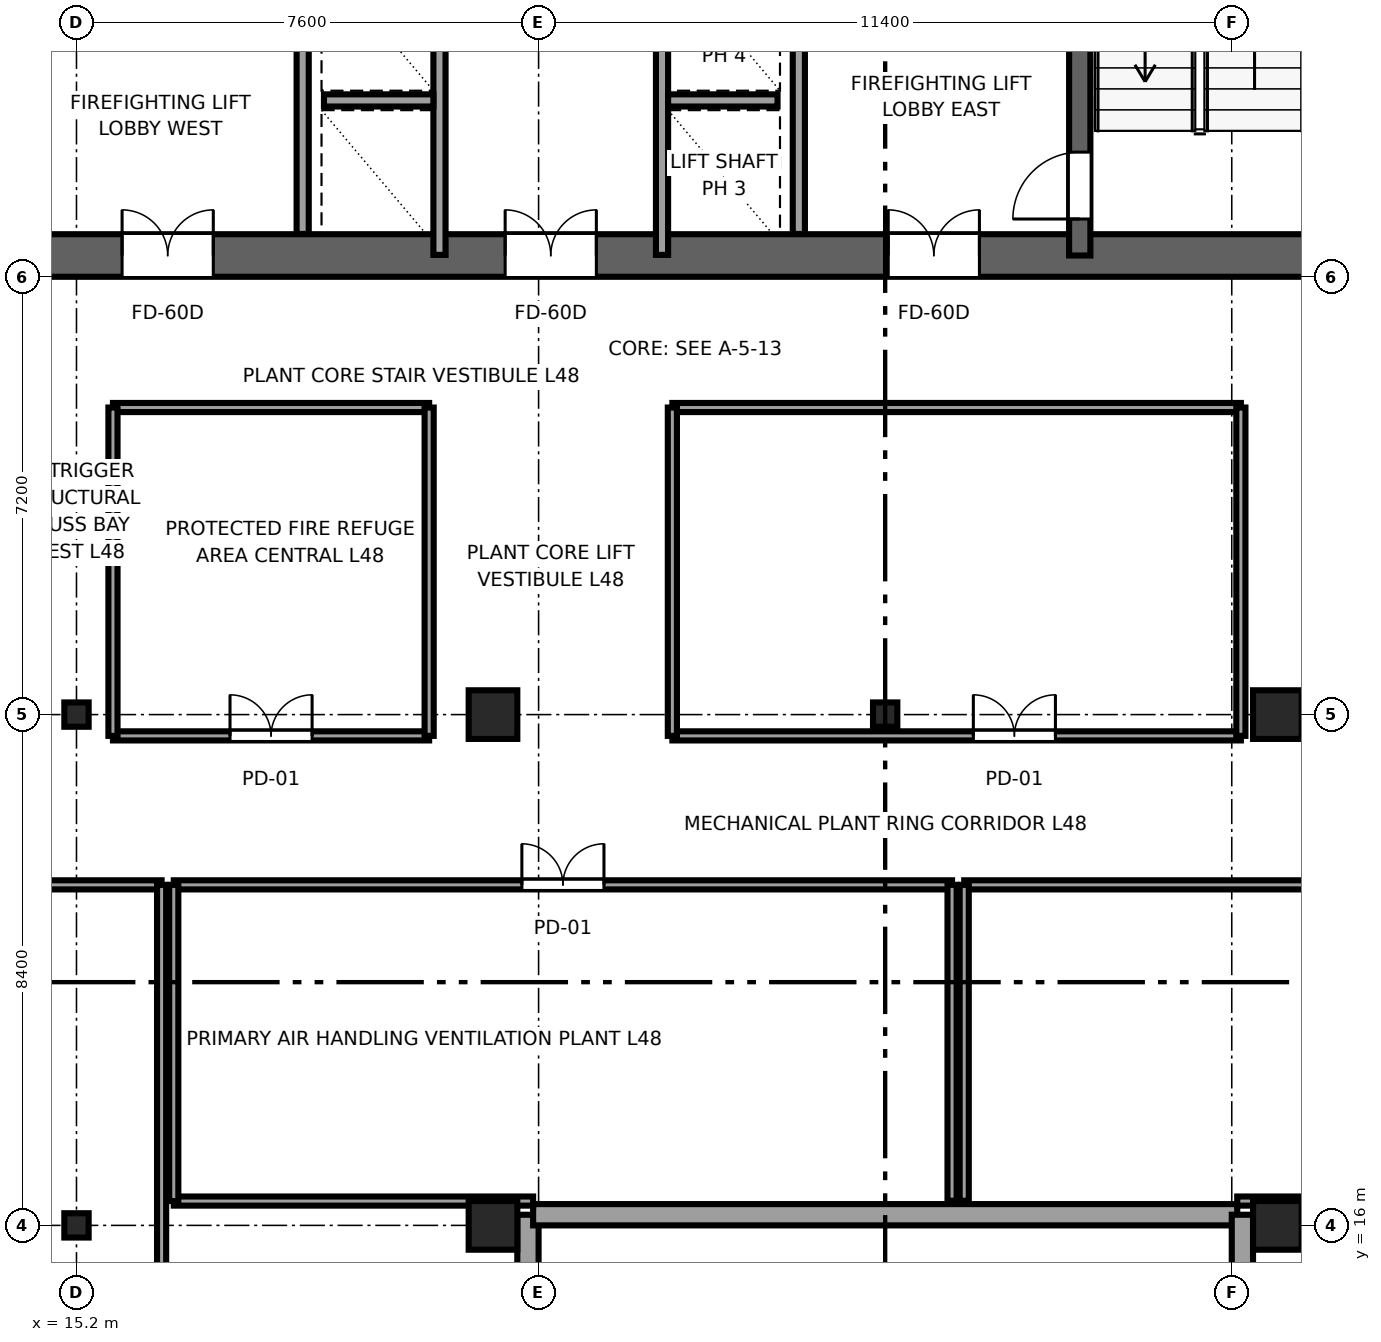
"""IFC4 building model, lengths in metres.
Left out: names, types, materials, properties, quantities, classifications, styles, units other than length and angle.
Written with IfcOpenShell. Run it as: python <this file> out.ifc"""

import sys

from ifc_helpers import new_model, si_unit, direction, frame, frame_2d, origin, origin_2d, place, context, subcontext, project, spatial, rectangle, i_section, extrude, source, transform, mapped, element, fill, save


model = new_model("IFC4")
c1 = context("Model", 3, precision=1e-05, world=origin(), true_north=direction((0.0, 1.0)))
c2 = subcontext(c1, "Body", "Model", "MODEL_VIEW")
j1 = project(units=[si_unit("LENGTHUNIT", "METRE"), si_unit("PLANEANGLEUNIT", "RADIAN")], contexts=[c1])
p1 = place(None, origin())
s1 = spatial("IfcSite", under=j1, at=p1, CompositionType="ELEMENT")
p2 = place(p1, origin())
s2 = spatial("IfcBuilding", under=s1, at=p2, CompositionType="ELEMENT")
p3 = place(p2, frame((0.0, 0.0, 182.55)))
s3 = spatial("IfcBuildingStorey", under=s2, at=p3, CompositionType="ELEMENT", Elevation=182.55)
p4 = place(p3, frame((9.8, 31.95, 0.0), z_axis=(0.0, 0.0, 1.0), x_axis=(1.0, 0.0, 0.0)))
e1 = element("IfcWall", 1, at=p4, inside=s3, PredefinedType="SHEAR", context=c2, shape_type="SweptSolid", body=[
    extrude(rectangle(XDim=26.4, YDim=0.7, at=frame_2d((13.2, 0.0))), origin(), (0.0, 0.0, 1.0), 5.0),
])
p5 = place(p4, frame((7.65, 0.0, 0.0), z_axis=(0.0, 0.0, 1.0), x_axis=(-1.0, 0.0, 0.0)))
e2 = element("IfcOpeningElement", 2, at=p5, cuts=e1, PredefinedType="OPENING", context=c2, shape_type="SweptSolid", body=[
    extrude(rectangle(XDim=1.5, YDim=2.04, at=frame_2d((0.75, 1.02))), frame((0.0, 0.36, 0.0), z_axis=(0.0, -1.0, 0.0), x_axis=(1.0, 0.0, 0.0)), (0.0, 0.0, 1.0), 0.72),
])
p6 = place(p4, frame((13.95, 0.0, 0.0), z_axis=(0.0, 0.0, 1.0), x_axis=(-1.0, 0.0, 0.0)))
e3 = element("IfcOpeningElement", 3, at=p6, cuts=e1, PredefinedType="OPENING", context=c2, shape_type="SweptSolid", body=[
    extrude(rectangle(XDim=1.5, YDim=2.04, at=frame_2d((0.75, 1.02))), frame((0.0, 0.36, 0.0), z_axis=(0.0, -1.0, 0.0), x_axis=(1.0, 0.0, 0.0)), (0.0, 0.0, 1.0), 0.72),
])
p7 = place(p4, frame((20.25, 0.0, 0.0), z_axis=(0.0, 0.0, 1.0), x_axis=(-1.0, 0.0, 0.0)))
e4 = element("IfcOpeningElement", 4, at=p7, cuts=e1, PredefinedType="OPENING", context=c2, shape_type="SweptSolid", body=[
    extrude(rectangle(XDim=1.5, YDim=2.04, at=frame_2d((0.75, 1.02))), frame((0.0, 0.36, 0.0), z_axis=(0.0, -1.0, 0.0), x_axis=(1.0, 0.0, 0.0)), (0.0, 0.0, 1.0), 0.72),
])
p8 = place(p3, frame((31.7, 31.95, 0.0), z_axis=(0.0, 0.0, 1.0), x_axis=(0.0, 1.0, 0.0)))
e5 = element("IfcWall", 5, at=p8, inside=s3, PredefinedType="SHEAR", context=c2, shape_type="SweptSolid", body=[
    extrude(rectangle(XDim=12.9, YDim=0.35, at=frame_2d((6.45, 0.0))), origin(), (0.0, 0.0, 1.0), 5.0),
])
p9 = place(p8, frame((1.7, 0.0, 0.0), z_axis=(0.0, 0.0, 1.0), x_axis=(-1.0, 0.0, 0.0)))
e6 = element("IfcOpeningElement", 6, at=p9, cuts=e5, PredefinedType="OPENING", context=c2, shape_type="SweptSolid", body=[
    extrude(rectangle(XDim=1.1, YDim=2.12, at=frame_2d((0.55, 1.06))), frame((0.0, 0.185, 0.0), z_axis=(0.0, -1.0, 0.0), x_axis=(1.0, 0.0, 0.0)), (0.0, 0.0, 1.0), 0.37),
])
m1 = source(origin(), c2, "Body", "SweptSolid", [
    extrude(i_section(OverallWidth=0.4, OverallDepth=0.4, WebThickness=0.02, FlangeThickness=0.035, at=origin_2d()), origin(), (0.0, 0.0, 1.0), 5.0),
])
for number, where, z_axis, x_axis in (
    (7, (15.2, 16.0, 0.0), (0.0, 0.0, 1.0), (1.0, 0.0, 0.0)),
    (8, (15.2, 24.4, 0.0), (0.0, 0.0, 1.0), (1.0, 0.0, 0.0)),
):
    element("IfcColumn", number, at=place(p3, frame(where, z_axis=z_axis, x_axis=x_axis)), inside=s3, PredefinedType="COLUMN", context=c2, shape_type="MappedRepresentation", body=[
        mapped(m1, transform((0.0, 0.0, 0.0), x_axis=(1.0, 0.0, 0.0), y_axis=(0.0, 1.0, 0.0), z_axis=(0.0, 0.0, 1.0), scale=1.0)),
    ])
m2 = source(origin(), c2, "Body", "SweptSolid", [
    extrude(rectangle(XDim=0.8, YDim=0.8, at=origin_2d()), origin(), (0.0, 0.0, 1.0), 5.0),
])
for number, where, z_axis, x_axis in (
    (9, (22.05, 16.0, 0.0), (0.0, 0.0, 1.0), (1.0, 0.0, 0.0)),
    (10, (22.05, 24.4, 0.0), (0.0, 0.0, 1.0), (1.0, 0.0, 0.0)),
    (11, (34.95, 16.0, 0.0), (0.0, 0.0, 1.0), (1.0, 0.0, 0.0)),
    (12, (34.95, 24.4, 0.0), (0.0, 0.0, 1.0), (1.0, 0.0, 0.0)),
):
    element("IfcColumn", number, at=place(p3, frame(where, z_axis=z_axis, x_axis=x_axis)), inside=s3, PredefinedType="COLUMN", context=c2, shape_type="MappedRepresentation", body=[
        mapped(m2, transform((0.0, 0.0, 0.0), x_axis=(1.0, 0.0, 0.0), y_axis=(0.0, 1.0, 0.0), z_axis=(0.0, 0.0, 1.0), scale=1.0)),
    ])
p10 = place(p3, frame((28.5, 24.4, 0.0), z_axis=(0.0, 0.0, 1.0), x_axis=(1.0, 0.0, 0.0)))
e13 = element("IfcColumn", 13, at=p10, inside=s3, PredefinedType="COLUMN", context=c2, shape_type="MappedRepresentation", body=[
    mapped(m1, transform((0.0, 0.0, 0.0), x_axis=(1.0, 0.0, 0.0), y_axis=(0.0, 1.0, 0.0), z_axis=(0.0, 0.0, 1.0), scale=1.0)),
])
p11 = place(p3, frame((22.625, 2.775, 0.0), z_axis=(0.0, 0.0, 1.0), x_axis=(0.0, 1.0, 0.0)))
e14 = element("IfcWall", 14, at=p11, inside=s3, PredefinedType="SOLIDWALL", context=c2, shape_type="SweptSolid", body=[
    extrude(rectangle(XDim=13.4, YDim=0.35, at=frame_2d((6.7, 0.0))), origin(), (0.0, 0.0, 1.0), 4.82),
])
p12 = place(p3, frame((22.71, 16.175, 0.0), z_axis=(0.0, 0.0, 1.0), x_axis=(1.0, 0.0, 0.0)))
e15 = element("IfcWall", 15, at=p12, inside=s3, PredefinedType="SOLIDWALL", context=c2, shape_type="SweptSolid", body=[
    extrude(rectangle(XDim=11.58, YDim=0.35, at=frame_2d((5.79, 0.0))), origin(), (0.0, 0.0, 1.0), 4.208),
])
p13 = place(p3, frame((34.375, 16.175, 0.0), z_axis=(0.0, 0.0, 1.0), x_axis=(0.0, -1.0, 0.0)))
e16 = element("IfcWall", 16, at=p13, inside=s3, PredefinedType="SOLIDWALL", context=c2, shape_type="SweptSolid", body=[
    extrude(rectangle(XDim=13.4, YDim=0.35, at=frame_2d((6.7, 0.0))), origin(), (0.0, 0.0, 1.0), 4.82),
])
for number, where, z_axis, x_axis in (
    (17, (18.92, 32.304, 0.0), (0.0, 0.0, 1.0), (0.0, 1.0, 0.0)),
    (18, (27.08, 32.304, 0.0), (0.0, 0.0, 1.0), (0.0, 1.0, 0.0)),
):
    element("IfcWall", number, at=place(p3, frame(where, z_axis=z_axis, x_axis=x_axis)), inside=s3, PredefinedType="SOLIDWALL", context=c2, shape_type="SweptSolid", body=[
        extrude(rectangle(XDim=3.846, YDim=0.2, at=frame_2d((1.923, 0.0))), origin(), (0.0, 0.0, 1.0), 4.82),
    ])
p14 = place(p3, frame((21.17, 31.96, 0.0), z_axis=(0.0, 0.0, 1.0), x_axis=(0.0, 1.0, 0.0)))
e19 = element("IfcWall", 19, at=p14, inside=s3, PredefinedType="SOLIDWALL", context=c2, shape_type="SweptSolid", body=[
    extrude(rectangle(XDim=12.58, YDim=0.2, at=frame_2d((6.29, 0.0))), origin(), (0.0, 0.0, 1.0), 4.82),
])
p15 = place(p14, frame((5.74, 0.0, 0.0)))
e20 = element("IfcOpeningElement", 20, at=p15, cuts=e19, PredefinedType="OPENING", context=c2, shape_type="SweptSolid", body=[
    extrude(rectangle(XDim=1.1, YDim=2.12, at=frame_2d((0.55, 1.06))), frame((0.0, 0.11, 0.0), z_axis=(0.0, -1.0, 0.0), x_axis=(1.0, 0.0, 0.0)), (0.0, 0.0, 1.0), 0.22),
])
p16 = place(p14, frame((8.24, 0.0, 0.0)))
e21 = element("IfcOpeningElement", 21, at=p16, cuts=e19, PredefinedType="OPENING", context=c2, shape_type="SweptSolid", body=[
    extrude(rectangle(XDim=1.1, YDim=2.12, at=frame_2d((0.55, 1.06))), frame((0.0, 0.11, 0.0), z_axis=(0.0, -1.0, 0.0), x_axis=(1.0, 0.0, 0.0)), (0.0, 0.0, 1.0), 0.22),
])
p17 = place(p3, frame((19.27, 34.5, 0.0), z_axis=(0.0, 0.0, 1.0), x_axis=(1.0, 0.0, 0.0)))
e22 = element("IfcWall", 22, at=p17, inside=s3, PredefinedType="SOLIDWALL", context=c2, shape_type="SweptSolid", body=[
    extrude(rectangle(XDim=1.8, YDim=0.2, at=frame_2d((0.9, 0.0))), origin(), (0.0, 0.0, 1.0), 4.82),
])
p18 = place(p3, frame((24.83, 31.96, 0.0), z_axis=(0.0, 0.0, 1.0), x_axis=(0.0, 1.0, 0.0)))
e23 = element("IfcWall", 23, at=p18, inside=s3, PredefinedType="SOLIDWALL", context=c2, shape_type="SweptSolid", body=[
    extrude(rectangle(XDim=12.58, YDim=0.2, at=frame_2d((6.29, 0.0))), origin(), (0.0, 0.0, 1.0), 4.82),
])
p19 = place(p18, frame((5.74, 0.0, 0.0)))
e24 = element("IfcOpeningElement", 24, at=p19, cuts=e23, PredefinedType="OPENING", context=c2, shape_type="SweptSolid", body=[
    extrude(rectangle(XDim=1.1, YDim=2.12, at=frame_2d((0.55, 1.06))), frame((0.0, 0.11, 0.0), z_axis=(0.0, -1.0, 0.0), x_axis=(1.0, 0.0, 0.0)), (0.0, 0.0, 1.0), 0.22),
])
p20 = place(p18, frame((8.24, 0.0, 0.0)))
e25 = element("IfcOpeningElement", 25, at=p20, cuts=e23, PredefinedType="OPENING", context=c2, shape_type="SweptSolid", body=[
    extrude(rectangle(XDim=1.1, YDim=2.12, at=frame_2d((0.55, 1.06))), frame((0.0, 0.11, 0.0), z_axis=(0.0, -1.0, 0.0), x_axis=(1.0, 0.0, 0.0)), (0.0, 0.0, 1.0), 0.22),
])
p21 = place(p3, frame((24.93, 34.5, 0.0), z_axis=(0.0, 0.0, 1.0), x_axis=(1.0, 0.0, 0.0)))
e26 = element("IfcWall", 26, at=p21, inside=s3, PredefinedType="SOLIDWALL", context=c2, shape_type="SweptSolid", body=[
    extrude(rectangle(XDim=1.8, YDim=0.2, at=frame_2d((0.9, 0.0))), origin(), (0.0, 0.0, 1.0), 4.82),
])
p22 = place(p3, frame((15.8, 24.05, 0.0), z_axis=(0.0, 0.0, 1.0), x_axis=(1.0, 0.0, 0.0)))
e27 = element("IfcWall", 27, at=p22, inside=s3, PredefinedType="PARTITIONING", context=c2, shape_type="SweptSolid", body=[
    extrude(rectangle(XDim=5.2, YDim=0.15, at=frame_2d((2.6, 0.0))), origin(), (0.0, 0.0, 1.0), 4.82),
])
p23 = place(p22, frame((1.925, 0.0, 0.0)))
e28 = element("IfcOpeningElement", 28, at=p23, cuts=e27, PredefinedType="OPENING", context=c2, shape_type="SweptSolid", body=[
    extrude(rectangle(XDim=1.35, YDim=2.15, at=frame_2d((0.675, 1.075))), frame((0.0, 0.085, 0.0), z_axis=(0.0, -1.0, 0.0), x_axis=(1.0, 0.0, 0.0)), (0.0, 0.0, 1.0), 0.17),
])
p24 = place(p3, frame((15.8, 29.45, 0.0), z_axis=(0.0, 0.0, 1.0), x_axis=(1.0, 0.0, 0.0)))
e29 = element("IfcWall", 29, at=p24, inside=s3, PredefinedType="PARTITIONING", context=c2, shape_type="SweptSolid", body=[
    extrude(rectangle(XDim=5.2, YDim=0.15, at=frame_2d((2.6, 0.0))), origin(), (0.0, 0.0, 1.0), 4.82),
])
for number, where, z_axis, x_axis in (
    (30, (15.8, 24.05, 0.0), (0.0, 0.0, 1.0), (0.0, 1.0, 0.0)),
    (31, (21.0, 24.05, 0.0), (0.0, 0.0, 1.0), (0.0, 1.0, 0.0)),
):
    element("IfcWall", number, at=place(p3, frame(where, z_axis=z_axis, x_axis=x_axis)), inside=s3, PredefinedType="PARTITIONING", context=c2, shape_type="SweptSolid", body=[
        extrude(rectangle(XDim=5.4, YDim=0.15, at=frame_2d((2.7, 0.0))), origin(), (0.0, 0.0, 1.0), 4.82),
    ])
p25 = place(p3, frame((25.0, 24.05, 0.0), z_axis=(0.0, 0.0, 1.0), x_axis=(1.0, 0.0, 0.0)))
e32 = element("IfcWall", 32, at=p25, inside=s3, PredefinedType="PARTITIONING", context=c2, shape_type="SweptSolid", body=[
    extrude(rectangle(XDim=9.35, YDim=0.15, at=frame_2d((4.675, 0.0))), origin(), (0.0, 0.0, 1.0), 4.82),
])
p26 = place(p25, frame((4.95, 0.0, 0.0)))
e33 = element("IfcOpeningElement", 33, at=p26, cuts=e32, PredefinedType="OPENING", context=c2, shape_type="SweptSolid", body=[
    extrude(rectangle(XDim=1.35, YDim=2.15, at=frame_2d((0.675, 1.075))), frame((0.0, 0.085, 0.0), z_axis=(0.0, -1.0, 0.0), x_axis=(1.0, 0.0, 0.0)), (0.0, 0.0, 1.0), 0.17),
])
p27 = place(p3, frame((25.0, 29.45, 0.0), z_axis=(0.0, 0.0, 1.0), x_axis=(1.0, 0.0, 0.0)))
e34 = element("IfcWall", 34, at=p27, inside=s3, PredefinedType="PARTITIONING", context=c2, shape_type="SweptSolid", body=[
    extrude(rectangle(XDim=9.35, YDim=0.15, at=frame_2d((4.675, 0.0))), origin(), (0.0, 0.0, 1.0), 4.82),
])
for number, where, z_axis, x_axis in (
    (35, (25.0, 24.05, 0.0), (0.0, 0.0, 1.0), (0.0, 1.0, 0.0)),
    (36, (34.35, 24.05, 0.0), (0.0, 0.0, 1.0), (0.0, 1.0, 0.0)),
):
    element("IfcWall", number, at=place(p3, frame(where, z_axis=z_axis, x_axis=x_axis)), inside=s3, PredefinedType="PARTITIONING", context=c2, shape_type="SweptSolid", body=[
        extrude(rectangle(XDim=5.4, YDim=0.15, at=frame_2d((2.7, 0.0))), origin(), (0.0, 0.0, 1.0), 4.82),
    ])
p28 = place(p3, frame((4.0, 21.6, 0.0), z_axis=(0.0, 0.0, 1.0), x_axis=(1.0, 0.0, 0.0)))
e37 = element("IfcWall", 37, at=p28, inside=s3, PredefinedType="PARTITIONING", context=c2, shape_type="SweptSolid", body=[
    extrude(rectangle(XDim=12.6, YDim=0.15, at=frame_2d((6.3, 0.0))), origin(), (0.0, 0.0, 1.0), 4.82),
])
p29 = place(p28, frame((5.625, 0.0, 0.0)))
e38 = element("IfcOpeningElement", 38, at=p29, cuts=e37, PredefinedType="OPENING", context=c2, shape_type="SweptSolid", body=[
    extrude(rectangle(XDim=1.35, YDim=2.15, at=frame_2d((0.675, 1.075))), frame((0.0, 0.085, 0.0), z_axis=(0.0, -1.0, 0.0), x_axis=(1.0, 0.0, 0.0)), (0.0, 0.0, 1.0), 0.17),
])
p30 = place(p3, frame((16.6, 3.005, 0.0), z_axis=(0.0, 0.0, 1.0), x_axis=(0.0, 1.0, 0.0)))
e39 = element("IfcWall", 39, at=p30, inside=s3, PredefinedType="PARTITIONING", context=c2, shape_type="SweptSolid", body=[
    extrude(rectangle(XDim=18.595, YDim=0.15, at=frame_2d((9.298, 0.0))), origin(), (0.0, 0.0, 1.0), 4.82),
])
p31 = place(p3, frame((16.8, 16.4, 0.0), z_axis=(0.0, 0.0, 1.0), x_axis=(1.0, 0.0, 0.0)))
e40 = element("IfcWall", 40, at=p31, inside=s3, PredefinedType="PARTITIONING", context=c2, shape_type="SweptSolid", body=[
    extrude(rectangle(XDim=5.91, YDim=0.15, at=frame_2d((2.955, 0.0))), origin(), (0.0, 0.0, 1.0), 4.82),
])
p32 = place(p3, frame((16.8, 21.6, 0.0), z_axis=(0.0, 0.0, 1.0), x_axis=(1.0, 0.0, 0.0)))
e41 = element("IfcWall", 41, at=p32, inside=s3, PredefinedType="PARTITIONING", context=c2, shape_type="SweptSolid", body=[
    extrude(rectangle(XDim=12.8, YDim=0.15, at=frame_2d((6.4, 0.0))), origin(), (0.0, 0.0, 1.0), 4.82),
])
p33 = place(p32, frame((5.725, 0.0, 0.0)))
e42 = element("IfcOpeningElement", 42, at=p33, cuts=e41, PredefinedType="OPENING", context=c2, shape_type="SweptSolid", body=[
    extrude(rectangle(XDim=1.35, YDim=2.15, at=frame_2d((0.675, 1.075))), frame((0.0, 0.085, 0.0), z_axis=(0.0, -1.0, 0.0), x_axis=(1.0, 0.0, 0.0)), (0.0, 0.0, 1.0), 0.17),
])
p34 = place(p3, frame((16.8, 16.4, 0.0), z_axis=(0.0, 0.0, 1.0), x_axis=(0.0, 1.0, 0.0)))
e43 = element("IfcWall", 43, at=p34, inside=s3, PredefinedType="PARTITIONING", context=c2, shape_type="SweptSolid", body=[
    extrude(rectangle(XDim=5.2, YDim=0.15, at=frame_2d((2.6, 0.0))), origin(), (0.0, 0.0, 1.0), 4.82),
])
p35 = place(p3, frame((29.6, 16.405, 0.0), z_axis=(0.0, 0.0, 1.0), x_axis=(0.0, 1.0, 0.0)))
e44 = element("IfcWall", 44, at=p35, inside=s3, PredefinedType="PARTITIONING", context=c2, shape_type="SweptSolid", body=[
    extrude(rectangle(XDim=5.195, YDim=0.15, at=frame_2d((2.598, 0.0))), origin(), (0.0, 0.0, 1.0), 4.82),
])
p36 = place(p3, frame((34.29, 16.4, 0.0), z_axis=(0.0, 0.0, 1.0), x_axis=(1.0, 0.0, 0.0)))
e45 = element("IfcWall", 45, at=p36, inside=s3, PredefinedType="PARTITIONING", context=c2, shape_type="SweptSolid", body=[
    extrude(rectangle(XDim=8.71, YDim=0.15, at=frame_2d((4.355, 0.0))), origin(), (0.0, 0.0, 1.0), 4.82),
])
p37 = place(p3, frame((29.8, 21.6, 0.0), z_axis=(0.0, 0.0, 1.0), x_axis=(1.0, 0.0, 0.0)))
e46 = element("IfcWall", 46, at=p37, inside=s3, PredefinedType="PARTITIONING", context=c2, shape_type="SweptSolid", body=[
    extrude(rectangle(XDim=13.2, YDim=0.15, at=frame_2d((6.6, 0.0))), origin(), (0.0, 0.0, 1.0), 4.82),
])
p38 = place(p37, frame((5.925, 0.0, 0.0)))
e47 = element("IfcOpeningElement", 47, at=p38, cuts=e46, PredefinedType="OPENING", context=c2, shape_type="SweptSolid", body=[
    extrude(rectangle(XDim=1.35, YDim=2.15, at=frame_2d((0.675, 1.075))), frame((0.0, 0.085, 0.0), z_axis=(0.0, -1.0, 0.0), x_axis=(1.0, 0.0, 0.0)), (0.0, 0.0, 1.0), 0.17),
])
p39 = place(p3, frame((29.8, 16.405, 0.0), z_axis=(0.0, 0.0, 1.0), x_axis=(0.0, 1.0, 0.0)))
e48 = element("IfcWall", 48, at=p39, inside=s3, PredefinedType="PARTITIONING", context=c2, shape_type="SweptSolid", body=[
    extrude(rectangle(XDim=5.195, YDim=0.15, at=frame_2d((2.598, 0.0))), origin(), (0.0, 0.0, 1.0), 4.82),
])
m3 = source(origin(), c2, "Body", "SweptSolid", [
    extrude(rectangle(XDim=1.1, YDim=2.12, at=frame_2d((0.55, 1.06))), frame((0.0, 0.025, 0.0), z_axis=(0.0, -1.0, 0.0), x_axis=(1.0, 0.0, 0.0)), (0.0, 0.0, 1.0), 0.05),
])
p40 = place(p9, origin())
e49 = element("IfcDoor", 49, at=p40, inside=s3, OperationType="SINGLE_SWING_LEFT", PredefinedType="DOOR", context=c2, shape_type="MappedRepresentation", body=[
    mapped(m3, transform((0.0, 0.0, 0.0), x_axis=(1.0, 0.0, 0.0), y_axis=(0.0, 1.0, 0.0), z_axis=(0.0, 0.0, 1.0), scale=1.0)),
])
fill(e6, e49)
m4 = source(origin(), c2, "Body", "SweptSolid", [
    extrude(rectangle(XDim=1.5, YDim=2.04, at=frame_2d((0.75, 1.02))), frame((0.0, 0.025, 0.0), z_axis=(0.0, -1.0, 0.0), x_axis=(1.0, 0.0, 0.0)), (0.0, 0.0, 1.0), 0.05),
])
p41 = place(p5, origin())
e50 = element("IfcDoor", 50, at=p41, inside=s3, OperationType="DOUBLE_DOOR_SINGLE_SWING", PredefinedType="DOOR", context=c2, shape_type="MappedRepresentation", body=[
    mapped(m4, transform((0.0, 0.0, 0.0), x_axis=(1.0, 0.0, 0.0), y_axis=(0.0, 1.0, 0.0), z_axis=(0.0, 0.0, 1.0), scale=1.0)),
])
fill(e2, e50)
p42 = place(p6, origin())
e51 = element("IfcDoor", 51, at=p42, inside=s3, OperationType="DOUBLE_DOOR_SINGLE_SWING", PredefinedType="DOOR", context=c2, shape_type="MappedRepresentation", body=[
    mapped(m4, transform((0.0, 0.0, 0.0), x_axis=(1.0, 0.0, 0.0), y_axis=(0.0, 1.0, 0.0), z_axis=(0.0, 0.0, 1.0), scale=1.0)),
])
fill(e3, e51)
p43 = place(p7, origin())
e52 = element("IfcDoor", 52, at=p43, inside=s3, OperationType="DOUBLE_DOOR_SINGLE_SWING", PredefinedType="DOOR", context=c2, shape_type="MappedRepresentation", body=[
    mapped(m4, transform((0.0, 0.0, 0.0), x_axis=(1.0, 0.0, 0.0), y_axis=(0.0, 1.0, 0.0), z_axis=(0.0, 0.0, 1.0), scale=1.0)),
])
fill(e4, e52)
m5 = source(origin(), c2, "Body", "SweptSolid", [
    extrude(rectangle(XDim=1.35, YDim=2.15, at=frame_2d((0.675, 1.075))), frame((0.0, 0.025, 0.0), z_axis=(0.0, -1.0, 0.0), x_axis=(1.0, 0.0, 0.0)), (0.0, 0.0, 1.0), 0.05),
])
p44 = place(p23, origin())
e53 = element("IfcDoor", 53, at=p44, inside=s3, OperationType="DOUBLE_DOOR_SINGLE_SWING", PredefinedType="DOOR", context=c2, shape_type="MappedRepresentation", body=[
    mapped(m5, transform((0.0, 0.0, 0.0), x_axis=(1.0, 0.0, 0.0), y_axis=(0.0, 1.0, 0.0), z_axis=(0.0, 0.0, 1.0), scale=1.0)),
])
fill(e28, e53)
p45 = place(p26, origin())
e54 = element("IfcDoor", 54, at=p45, inside=s3, OperationType="DOUBLE_DOOR_SINGLE_SWING", PredefinedType="DOOR", context=c2, shape_type="MappedRepresentation", body=[
    mapped(m5, transform((0.0, 0.0, 0.0), x_axis=(1.0, 0.0, 0.0), y_axis=(0.0, 1.0, 0.0), z_axis=(0.0, 0.0, 1.0), scale=1.0)),
])
fill(e33, e54)
p46 = place(p33, origin())
e55 = element("IfcDoor", 55, at=p46, inside=s3, OperationType="DOUBLE_DOOR_SINGLE_SWING", PredefinedType="DOOR", context=c2, shape_type="MappedRepresentation", body=[
    mapped(m5, transform((0.0, 0.0, 0.0), x_axis=(1.0, 0.0, 0.0), y_axis=(0.0, 1.0, 0.0), z_axis=(0.0, 0.0, 1.0), scale=1.0)),
])
fill(e42, e55)
save(model, sys.argv[1])
